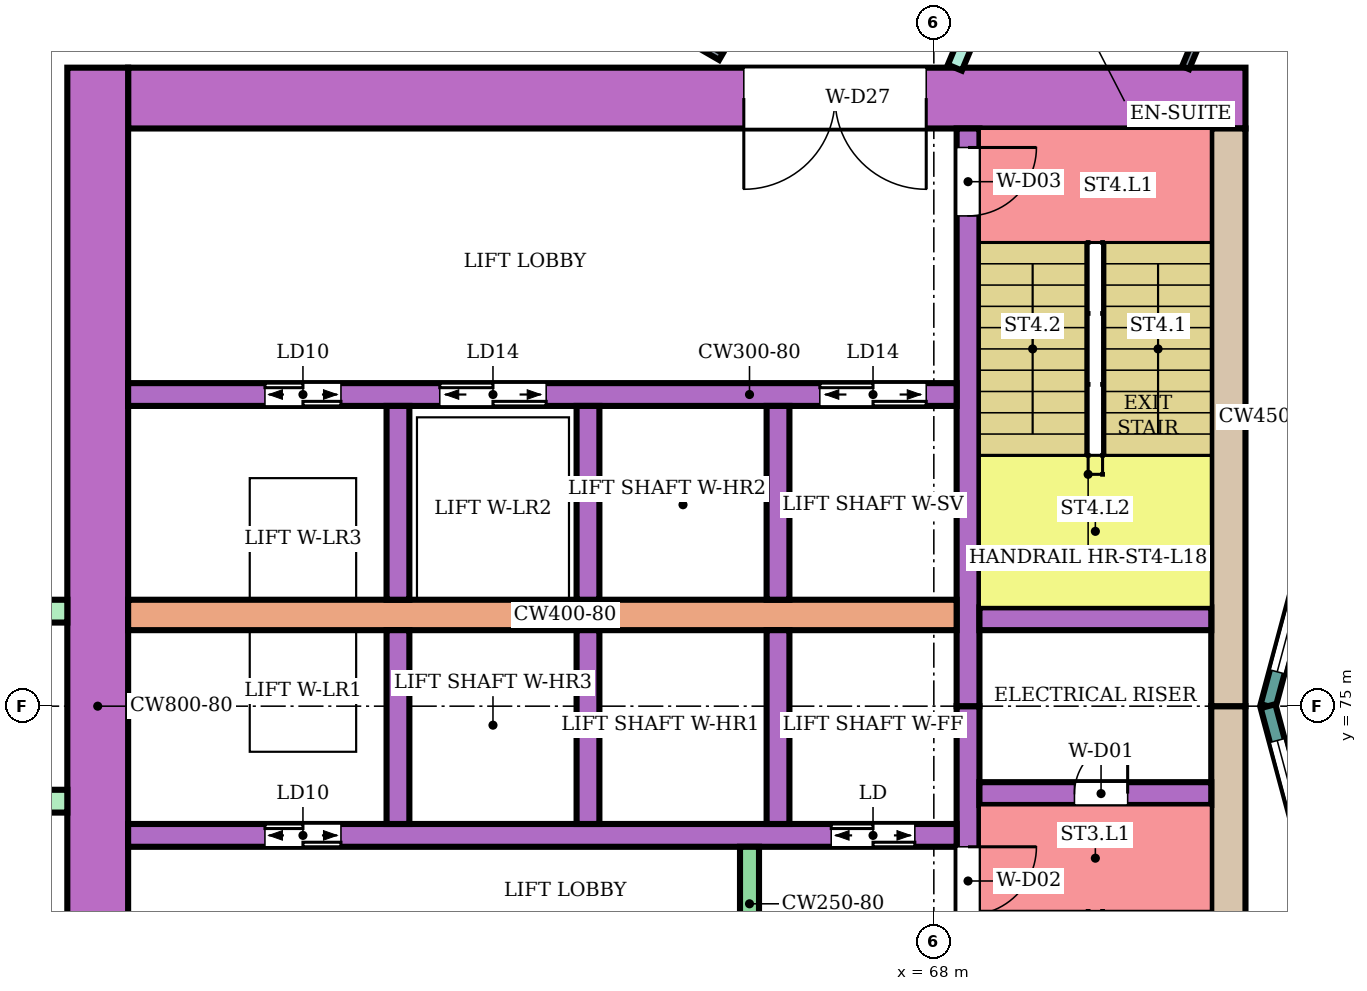
"""IFC4 building model, lengths in metres.
Left out: names, types, materials, properties, quantities, classifications, styles, units other than length and angle.
Written with IfcOpenShell. Run it as: python <this file> out.ifc"""

import sys

from ifc_helpers import new_model, si_unit, direction, frame, frame_2d, origin, place, context, subcontext, project, spatial, rectangle, extrude, element, fill, save


model = new_model("IFC4")
c1 = context("Model", 3, precision=1e-05, world=origin(), true_north=direction((0.0, 1.0)))
c2 = subcontext(c1, "Body", "Model", "MODEL_VIEW")
j1 = project(units=[si_unit("LENGTHUNIT", "METRE"), si_unit("PLANEANGLEUNIT", "RADIAN")], contexts=[c1])
p1 = place(None, origin())
s1 = spatial("IfcSite", under=j1, at=p1, CompositionType="ELEMENT")
p2 = place(p1, origin())
s2 = spatial("IfcBuilding", under=s1, at=p2, CompositionType="ELEMENT")
p3 = place(p2, frame((0.0, 0.0, 82.4)))
s3 = spatial("IfcBuildingStorey", under=s2, at=p3, CompositionType="ELEMENT", Elevation=82.4)
p4 = place(p3, frame((72.1, 83.0, 0.0), z_axis=(0.0, 0.0, 1.0), x_axis=(-1.0, 0.0, 0.0)))
e1 = element("IfcWall", 1, at=p4, inside=s3, PredefinedType="SHEAR", context=c2, shape_type="SweptSolid", body=[
    extrude(rectangle(XDim=14.7, YDim=0.8, at=frame_2d((7.35, 0.0))), origin(), (0.0, 0.0, 1.0), 3.48),
])
p5 = place(p4, frame((4.2, 0.0, 0.0)))
e2 = element("IfcOpeningElement", 2, at=p5, cuts=e1, PredefinedType="OPENING", context=c2, shape_type="SweptSolid", body=[
    extrude(rectangle(XDim=2.4, YDim=2.4, at=frame_2d((1.2, 1.2))), frame((0.0, 0.41, 0.0), z_axis=(0.0, -1.0, 0.0), x_axis=(1.0, 0.0, 0.0)), (0.0, 0.0, 1.0), 0.82),
])
for number, where, z_axis, x_axis in (
    (3, (71.875, 75.0, 0.0), (0.0, 0.0, 1.0), (0.0, -1.0, 0.0)),
    (4, (71.875, 82.6, 0.0), (0.0, 0.0, 1.0), (0.0, -1.0, 0.0)),
):
    element("IfcWall", number, at=place(p3, frame(where, z_axis=z_axis, x_axis=x_axis)), inside=s3, PredefinedType="SHEAR", context=c2, shape_type="SweptSolid", body=[
        extrude(rectangle(XDim=7.6, YDim=0.45, at=frame_2d((3.8, 0.0))), origin(), (0.0, 0.0, 1.0), 3.48),
    ])
p6 = place(p3, frame((57.0, 83.4, 0.0), z_axis=(0.0, 0.0, 1.0), x_axis=(0.0, -1.0, 0.0)))
e5 = element("IfcWall", 5, at=p6, inside=s3, PredefinedType="SHEAR", context=c2, shape_type="SweptSolid", body=[
    extrude(rectangle(XDim=16.8, YDim=0.8, at=frame_2d((8.4, 0.0))), origin(), (0.0, 0.0, 1.0), 3.48),
])
p7 = place(p3, frame((68.45, 75.0, 0.0), z_axis=(0.0, 0.0, 1.0), x_axis=(0.0, -1.0, 0.0)))
e6 = element("IfcWall", 6, at=p7, inside=s3, PredefinedType="SHEAR", context=c2, shape_type="SweptSolid", body=[
    extrude(rectangle(XDim=7.6, YDim=0.3, at=frame_2d((3.8, 0.0))), origin(), (0.0, 0.0, 1.0), 3.48),
])
p8 = place(p7, frame((1.85, 0.0, 0.0)))
e7 = element("IfcOpeningElement", 7, at=p8, cuts=e6, PredefinedType="OPENING", context=c2, shape_type="SweptSolid", body=[
    extrude(rectangle(XDim=0.9, YDim=2.1, at=frame_2d((0.45, 1.05))), frame((0.0, 0.16, 0.0), z_axis=(0.0, -1.0, 0.0), x_axis=(1.0, 0.0, 0.0)), (0.0, 0.0, 1.0), 0.32),
])
p9 = place(p3, frame((68.45, 82.6, 0.0), z_axis=(0.0, 0.0, 1.0), x_axis=(0.0, -1.0, 0.0)))
e8 = element("IfcWall", 8, at=p9, inside=s3, PredefinedType="SHEAR", context=c2, shape_type="SweptSolid", body=[
    extrude(rectangle(XDim=7.6, YDim=0.3, at=frame_2d((3.8, 0.0))), origin(), (0.0, 0.0, 1.0), 3.48),
])
p10 = place(p9, frame((0.25, 0.0, 0.0)))
e9 = element("IfcOpeningElement", 9, at=p10, cuts=e8, PredefinedType="OPENING", context=c2, shape_type="SweptSolid", body=[
    extrude(rectangle(XDim=0.9, YDim=2.1, at=frame_2d((0.45, 1.05))), frame((0.0, 0.16, 0.0), z_axis=(0.0, -1.0, 0.0), x_axis=(1.0, 0.0, 0.0)), (0.0, 0.0, 1.0), 0.32),
])
p11 = place(p3, frame((71.65, 73.85, 0.0), z_axis=(0.0, 0.0, 1.0), x_axis=(-1.0, 0.0, 0.0)))
e10 = element("IfcWall", 10, at=p11, inside=s3, PredefinedType="SHEAR", context=c2, shape_type="SweptSolid", body=[
    extrude(rectangle(XDim=3.05, YDim=0.3, at=frame_2d((1.525, 0.0))), origin(), (0.0, 0.0, 1.0), 3.48),
])
p12 = place(p11, frame((1.1, 0.0, 0.0)))
e11 = element("IfcOpeningElement", 11, at=p12, cuts=e10, PredefinedType="OPENING", context=c2, shape_type="SweptSolid", body=[
    extrude(rectangle(XDim=0.7, YDim=2.0, at=frame_2d((0.35, 1.0))), frame((0.0, 0.16, 0.0), z_axis=(0.0, -1.0, 0.0), x_axis=(1.0, 0.0, 0.0)), (0.0, 0.0, 1.0), 0.32),
])
p13 = place(p3, frame((71.65, 76.15, 0.0), z_axis=(0.0, 0.0, 1.0), x_axis=(-1.0, 0.0, 0.0)))
e12 = element("IfcWall", 12, at=p13, inside=s3, PredefinedType="SHEAR", context=c2, shape_type="SweptSolid", body=[
    extrude(rectangle(XDim=3.05, YDim=0.3, at=frame_2d((1.525, 0.0))), origin(), (0.0, 0.0, 1.0), 3.48),
])
p14 = place(p3, frame((68.3, 73.3, 0.0), z_axis=(0.0, 0.0, 1.0), x_axis=(-1.0, 0.0, 0.0)))
e13 = element("IfcWall", 13, at=p14, inside=s3, PredefinedType="SHEAR", context=c2, shape_type="SweptSolid", body=[
    extrude(rectangle(XDim=10.9, YDim=0.3, at=frame_2d((5.45, 0.0))), origin(), (0.0, 0.0, 1.0), 3.48),
])
p15 = place(p14, frame((0.55, 0.0, 0.0)))
e14 = element("IfcOpeningElement", 14, at=p15, cuts=e13, PredefinedType="OPENING", context=c2, shape_type="SweptSolid", body=[
    extrude(rectangle(XDim=1.1, YDim=2.1, at=frame_2d((0.55, 1.05))), frame((0.0, 0.16, 0.0), z_axis=(0.0, -1.0, 0.0), x_axis=(1.0, 0.0, 0.0)), (0.0, 0.0, 1.0), 0.32),
])
p16 = place(p14, frame((8.1, 0.0, 0.0)))
e15 = element("IfcOpeningElement", 15, at=p16, cuts=e13, PredefinedType="OPENING", context=c2, shape_type="SweptSolid", body=[
    extrude(rectangle(XDim=1.0, YDim=2.1, at=frame_2d((0.5, 1.05))), frame((0.0, 0.16, 0.0), z_axis=(0.0, -1.0, 0.0), x_axis=(1.0, 0.0, 0.0)), (0.0, 0.0, 1.0), 0.32),
])
p17 = place(p3, frame((68.3, 76.2, 0.0), z_axis=(0.0, 0.0, 1.0), x_axis=(-1.0, 0.0, 0.0)))
e16 = element("IfcWall", 16, at=p17, inside=s3, PredefinedType="SHEAR", context=c2, shape_type="SweptSolid", body=[
    extrude(rectangle(XDim=10.9, YDim=0.4, at=frame_2d((5.45, 0.0))), origin(), (0.0, 0.0, 1.0), 3.48),
])
p18 = place(p3, frame((68.3, 79.1, 0.0), z_axis=(0.0, 0.0, 1.0), x_axis=(-1.0, 0.0, 0.0)))
e17 = element("IfcWall", 17, at=p18, inside=s3, PredefinedType="SHEAR", context=c2, shape_type="SweptSolid", body=[
    extrude(rectangle(XDim=10.9, YDim=0.3, at=frame_2d((5.45, 0.0))), origin(), (0.0, 0.0, 1.0), 3.48),
])
p19 = place(p18, frame((0.4, 0.0, 0.0)))
e18 = element("IfcOpeningElement", 18, at=p19, cuts=e17, PredefinedType="OPENING", context=c2, shape_type="SweptSolid", body=[
    extrude(rectangle(XDim=1.4, YDim=2.1, at=frame_2d((0.7, 1.05))), frame((0.0, 0.16, 0.0), z_axis=(0.0, -1.0, 0.0), x_axis=(1.0, 0.0, 0.0)), (0.0, 0.0, 1.0), 0.32),
])
p20 = place(p18, frame((5.4, 0.0, 0.0)))
e19 = element("IfcOpeningElement", 19, at=p20, cuts=e17, PredefinedType="OPENING", context=c2, shape_type="SweptSolid", body=[
    extrude(rectangle(XDim=1.4, YDim=2.1, at=frame_2d((0.7, 1.05))), frame((0.0, 0.16, 0.0), z_axis=(0.0, -1.0, 0.0), x_axis=(1.0, 0.0, 0.0)), (0.0, 0.0, 1.0), 0.32),
])
p21 = place(p18, frame((8.1, 0.0, 0.0)))
e20 = element("IfcOpeningElement", 20, at=p21, cuts=e17, PredefinedType="OPENING", context=c2, shape_type="SweptSolid", body=[
    extrude(rectangle(XDim=1.0, YDim=2.1, at=frame_2d((0.5, 1.05))), frame((0.0, 0.16, 0.0), z_axis=(0.0, -1.0, 0.0), x_axis=(1.0, 0.0, 0.0)), (0.0, 0.0, 1.0), 0.32),
])
for number, where, z_axis, x_axis in (
    (21, (65.95, 76.0, 0.0), (0.0, 0.0, 1.0), (0.0, -1.0, 0.0)),
    (22, (63.45, 76.0, 0.0), (0.0, 0.0, 1.0), (0.0, -1.0, 0.0)),
    (23, (60.95, 76.0, 0.0), (0.0, 0.0, 1.0), (0.0, -1.0, 0.0)),
    (24, (65.95, 78.95, 0.0), (0.0, 0.0, 1.0), (0.0, -1.0, 0.0)),
    (25, (63.45, 78.95, 0.0), (0.0, 0.0, 1.0), (0.0, -1.0, 0.0)),
    (26, (60.95, 78.95, 0.0), (0.0, 0.0, 1.0), (0.0, -1.0, 0.0)),
):
    element("IfcWall", number, at=place(p3, frame(where, z_axis=z_axis, x_axis=x_axis)), inside=s3, PredefinedType="SHEAR", context=c2, shape_type="SweptSolid", body=[
        extrude(rectangle(XDim=2.55, YDim=0.3, at=frame_2d((1.275, 0.0))), origin(), (0.0, 0.0, 1.0), 3.48),
    ])
p22 = place(p3, frame((65.575, 73.15, 0.0), z_axis=(0.0, 0.0, 1.0), x_axis=(0.0, -1.0, 0.0)))
e27 = element("IfcWall", 27, at=p22, inside=s3, PredefinedType="SHEAR", context=c2, shape_type="SweptSolid", body=[
    extrude(rectangle(XDim=1.5, YDim=0.25, at=frame_2d((0.75, 0.0))), origin(), (0.0, 0.0, 1.0), 3.48),
])
for number, where, z_axis, x_axis in (
    (28, (56.6, 76.25, 0.0), (0.0, 0.0, 1.0), (-1.0, 0.0, 0.0)),
    (29, (56.6, 73.75, 0.0), (0.0, 0.0, 1.0), (-1.0, 0.0, 0.0)),
):
    element("IfcWall", number, at=place(p3, frame(where, z_axis=z_axis, x_axis=x_axis)), inside=s3, PredefinedType="NOTDEFINED", context=c2, shape_type="SweptSolid", body=[
        extrude(rectangle(XDim=2.416, YDim=0.3, at=frame_2d((1.208, 0.0))), origin(), (0.0, 0.0, 1.0), 3.8),
    ])
p23 = place(p3, frame((73.415, 78.802, 0.0), z_axis=(0.0, 0.0, 1.0), x_axis=(-0.258789828301, -0.965933654434, 0.0)))
e30 = element("IfcWall", 30, at=p23, inside=s3, PredefinedType="NOTDEFINED", context=c2, shape_type="SweptSolid", body=[
    extrude(rectangle(XDim=3.936, YDim=0.2, at=frame_2d((1.968, 0.0))), origin(), (0.0, 0.0, 1.0), 3.8),
])
p24 = place(p23, frame((0.468, 0.0, 0.9)))
e31 = element("IfcOpeningElement", 31, at=p24, cuts=e30, PredefinedType="OPENING", context=c2, shape_type="SweptSolid", body=[
    extrude(rectangle(XDim=3.0, YDim=2.3, at=frame_2d((1.5, 1.15))), frame((0.0, 0.11, 0.0), z_axis=(0.0, -1.0, 0.0), x_axis=(1.0, 0.0, 0.0)), (0.0, 0.0, 1.0), 0.22),
])
p25 = place(p3, frame((72.396, 75.0, 0.0), z_axis=(0.0, 0.0, 1.0), x_axis=(0.258789828301, -0.965933654434, 0.0)))
e32 = element("IfcWall", 32, at=p25, inside=s3, PredefinedType="NOTDEFINED", context=c2, shape_type="SweptSolid", body=[
    extrude(rectangle(XDim=3.936, YDim=0.2, at=frame_2d((1.968, 0.0))), origin(), (0.0, 0.0, 1.0), 3.8),
])
p26 = place(p25, frame((0.468, 0.0, 0.9)))
e33 = element("IfcOpeningElement", 33, at=p26, cuts=e32, PredefinedType="OPENING", context=c2, shape_type="SweptSolid", body=[
    extrude(rectangle(XDim=3.0, YDim=2.3, at=frame_2d((1.5, 1.15))), frame((0.0, 0.11, 0.0), z_axis=(0.0, -1.0, 0.0), x_axis=(1.0, 0.0, 0.0)), (0.0, 0.0, 1.0), 0.22),
])
p27 = place(p3, frame((68.277, 83.4, 0.0), z_axis=(0.0, 0.0, 1.0), x_axis=(0.386454861164, 0.922308321703, 0.0)))
e34 = element("IfcWall", 34, at=p27, inside=s3, PredefinedType="PARTITIONING", context=c2, shape_type="SweptSolid", body=[
    extrude(rectangle(XDim=7.762, YDim=0.2, at=frame_2d((3.881, 0.0))), origin(), (0.0, 0.0, 1.0), 3.35),
])
p28 = place(p27, frame((5.351, 0.0, 0.0)))
e35 = element("IfcOpeningElement", 35, at=p28, cuts=e34, PredefinedType="OPENING", context=c2, shape_type="SweptSolid", body=[
    extrude(rectangle(XDim=1.0, YDim=2.1, at=frame_2d((0.5, 1.05))), frame((0.0, 0.11, 0.0), z_axis=(0.0, -1.0, 0.0), x_axis=(1.0, 0.0, 0.0)), (0.0, 0.0, 1.0), 0.22),
])
p29 = place(p3, frame((71.264, 90.135, 0.0), z_axis=(0.0, 0.0, 1.0), x_axis=(0.499791624077, -0.866145676259, 0.0)))
e36 = element("IfcWall", 36, at=p29, inside=s3, PredefinedType="PARTITIONING", context=c2, shape_type="SweptSolid", body=[
    extrude(rectangle(XDim=9.778, YDim=0.2, at=frame_2d((4.889, 0.0))), origin(), (0.0, 0.0, 1.0), 3.35),
])
p30 = place(p3, frame((57.659, 87.899, 0.0), z_axis=(0.0, 0.0, 1.0), x_axis=(0.86602264145, -0.500004784474, 0.0)))
e37 = element("IfcWall", 37, at=p30, inside=s3, PredefinedType="PARTITIONING", context=c2, shape_type="SweptSolid", body=[
    extrude(rectangle(XDim=8.708, YDim=0.1, at=frame_2d((4.354, 0.0))), origin(), (0.0, 0.0, 1.0), 3.35),
])
p31 = place(p30, frame((3.929, 0.0, 0.0)))
e38 = element("IfcOpeningElement", 38, at=p31, cuts=e37, PredefinedType="OPENING", context=c2, shape_type="SweptSolid", body=[
    extrude(rectangle(XDim=0.9, YDim=2.1, at=frame_2d((0.45, 1.05))), frame((0.0, 0.06, 0.0), z_axis=(0.0, -1.0, 0.0), x_axis=(1.0, 0.0, 0.0)), (0.0, 0.0, 1.0), 0.12),
])
p32 = place(p3, frame((71.313, 83.4, 0.0), z_axis=(0.0, 0.0, 1.0), x_axis=(0.386148512695, 0.922436624459, 0.0)))
e39 = element("IfcWall", 39, at=p32, inside=s3, PredefinedType="PARTITIONING", context=c2, shape_type="SweptSolid", body=[
    extrude(rectangle(XDim=0.927, YDim=0.1, at=frame_2d((0.463, 0.0))), origin(), (0.0, 0.0, 1.0), 3.35),
])
p33 = place(p24, origin())
e40 = element("IfcWindow", 40, at=p33, inside=s3, PartitioningType="SINGLE_PANEL", PredefinedType="WINDOW", context=c2, shape_type="SweptSolid", body=[
    extrude(rectangle(XDim=3.0, YDim=2.3, at=frame_2d((1.5, 1.15))), frame((0.0, 0.03, 0.0), z_axis=(0.0, -1.0, 0.0), x_axis=(1.0, 0.0, 0.0)), (0.0, 0.0, 1.0), 0.06),
])
fill(e31, e40)
p34 = place(p26, origin())
e41 = element("IfcWindow", 41, at=p34, inside=s3, PartitioningType="SINGLE_PANEL", PredefinedType="WINDOW", context=c2, shape_type="SweptSolid", body=[
    extrude(rectangle(XDim=3.0, YDim=2.3, at=frame_2d((1.5, 1.15))), frame((0.0, 0.03, 0.0), z_axis=(0.0, -1.0, 0.0), x_axis=(1.0, 0.0, 0.0)), (0.0, 0.0, 1.0), 0.06),
])
fill(e33, e41)
p35 = place(p12, frame((0.7, 0.0, 0.0), z_axis=(0.0, 0.0, 1.0), x_axis=(-1.0, 0.0, 0.0)))
e42 = element("IfcDoor", 42, at=p35, inside=s3, OperationType="SINGLE_SWING_RIGHT", PredefinedType="DOOR", context=c2, shape_type="SweptSolid", body=[
    extrude(rectangle(XDim=0.7, YDim=2.0, at=frame_2d((0.35, 1.0))), frame((0.0, 0.025, 0.0), z_axis=(0.0, -1.0, 0.0), x_axis=(1.0, 0.0, 0.0)), (0.0, 0.0, 1.0), 0.05),
])
fill(e11, e42)
p36 = place(p8, origin())
e43 = element("IfcDoor", 43, at=p36, inside=s3, OperationType="SINGLE_SWING_LEFT", PredefinedType="DOOR", context=c2, shape_type="SweptSolid", body=[
    extrude(rectangle(XDim=0.9, YDim=2.1, at=frame_2d((0.45, 1.05))), frame((0.0, 0.025, 0.0), z_axis=(0.0, -1.0, 0.0), x_axis=(1.0, 0.0, 0.0)), (0.0, 0.0, 1.0), 0.05),
])
fill(e7, e43)
p37 = place(p10, origin())
e44 = element("IfcDoor", 44, at=p37, inside=s3, OperationType="SINGLE_SWING_LEFT", PredefinedType="DOOR", context=c2, shape_type="SweptSolid", body=[
    extrude(rectangle(XDim=0.9, YDim=2.1, at=frame_2d((0.45, 1.05))), frame((0.0, 0.025, 0.0), z_axis=(0.0, -1.0, 0.0), x_axis=(1.0, 0.0, 0.0)), (0.0, 0.0, 1.0), 0.05),
])
fill(e9, e44)
p38 = place(p15, origin())
e45 = element("IfcDoor", 45, at=p38, inside=s3, OperationType="DOUBLE_DOOR_SLIDING", PredefinedType="DOOR", context=c2, shape_type="SweptSolid", body=[
    extrude(rectangle(XDim=1.1, YDim=2.1, at=frame_2d((0.55, 1.05))), frame((0.0, 0.025, 0.0), z_axis=(0.0, -1.0, 0.0), x_axis=(1.0, 0.0, 0.0)), (0.0, 0.0, 1.0), 0.05),
])
fill(e14, e45)
p39 = place(p16, origin())
e46 = element("IfcDoor", 46, at=p39, inside=s3, OperationType="DOUBLE_DOOR_SLIDING", PredefinedType="DOOR", context=c2, shape_type="SweptSolid", body=[
    extrude(rectangle(XDim=1.0, YDim=2.1, at=frame_2d((0.5, 1.05))), frame((0.0, 0.025, 0.0), z_axis=(0.0, -1.0, 0.0), x_axis=(1.0, 0.0, 0.0)), (0.0, 0.0, 1.0), 0.05),
])
fill(e15, e46)
p40 = place(p19, origin())
e47 = element("IfcDoor", 47, at=p40, inside=s3, OperationType="DOUBLE_DOOR_SLIDING", PredefinedType="DOOR", context=c2, shape_type="SweptSolid", body=[
    extrude(rectangle(XDim=1.4, YDim=2.1, at=frame_2d((0.7, 1.05))), frame((0.0, 0.025, 0.0), z_axis=(0.0, -1.0, 0.0), x_axis=(1.0, 0.0, 0.0)), (0.0, 0.0, 1.0), 0.05),
])
fill(e18, e47)
p41 = place(p20, origin())
e48 = element("IfcDoor", 48, at=p41, inside=s3, OperationType="DOUBLE_DOOR_SLIDING", PredefinedType="DOOR", context=c2, shape_type="SweptSolid", body=[
    extrude(rectangle(XDim=1.4, YDim=2.1, at=frame_2d((0.7, 1.05))), frame((0.0, 0.025, 0.0), z_axis=(0.0, -1.0, 0.0), x_axis=(1.0, 0.0, 0.0)), (0.0, 0.0, 1.0), 0.05),
])
fill(e19, e48)
p42 = place(p21, origin())
e49 = element("IfcDoor", 49, at=p42, inside=s3, OperationType="DOUBLE_DOOR_SLIDING", PredefinedType="DOOR", context=c2, shape_type="SweptSolid", body=[
    extrude(rectangle(XDim=1.0, YDim=2.1, at=frame_2d((0.5, 1.05))), frame((0.0, 0.025, 0.0), z_axis=(0.0, -1.0, 0.0), x_axis=(1.0, 0.0, 0.0)), (0.0, 0.0, 1.0), 0.05),
])
fill(e20, e49)
p43 = place(p5, origin())
e50 = element("IfcDoor", 50, at=p43, inside=s3, OperationType="DOUBLE_DOOR_SINGLE_SWING", PredefinedType="DOOR", context=c2, shape_type="SweptSolid", body=[
    extrude(rectangle(XDim=2.4, YDim=2.4, at=frame_2d((1.2, 1.2))), frame((0.0, 0.025, 0.0), z_axis=(0.0, -1.0, 0.0), x_axis=(1.0, 0.0, 0.0)), (0.0, 0.0, 1.0), 0.05),
])
fill(e2, e50)
save(model, sys.argv[1])
